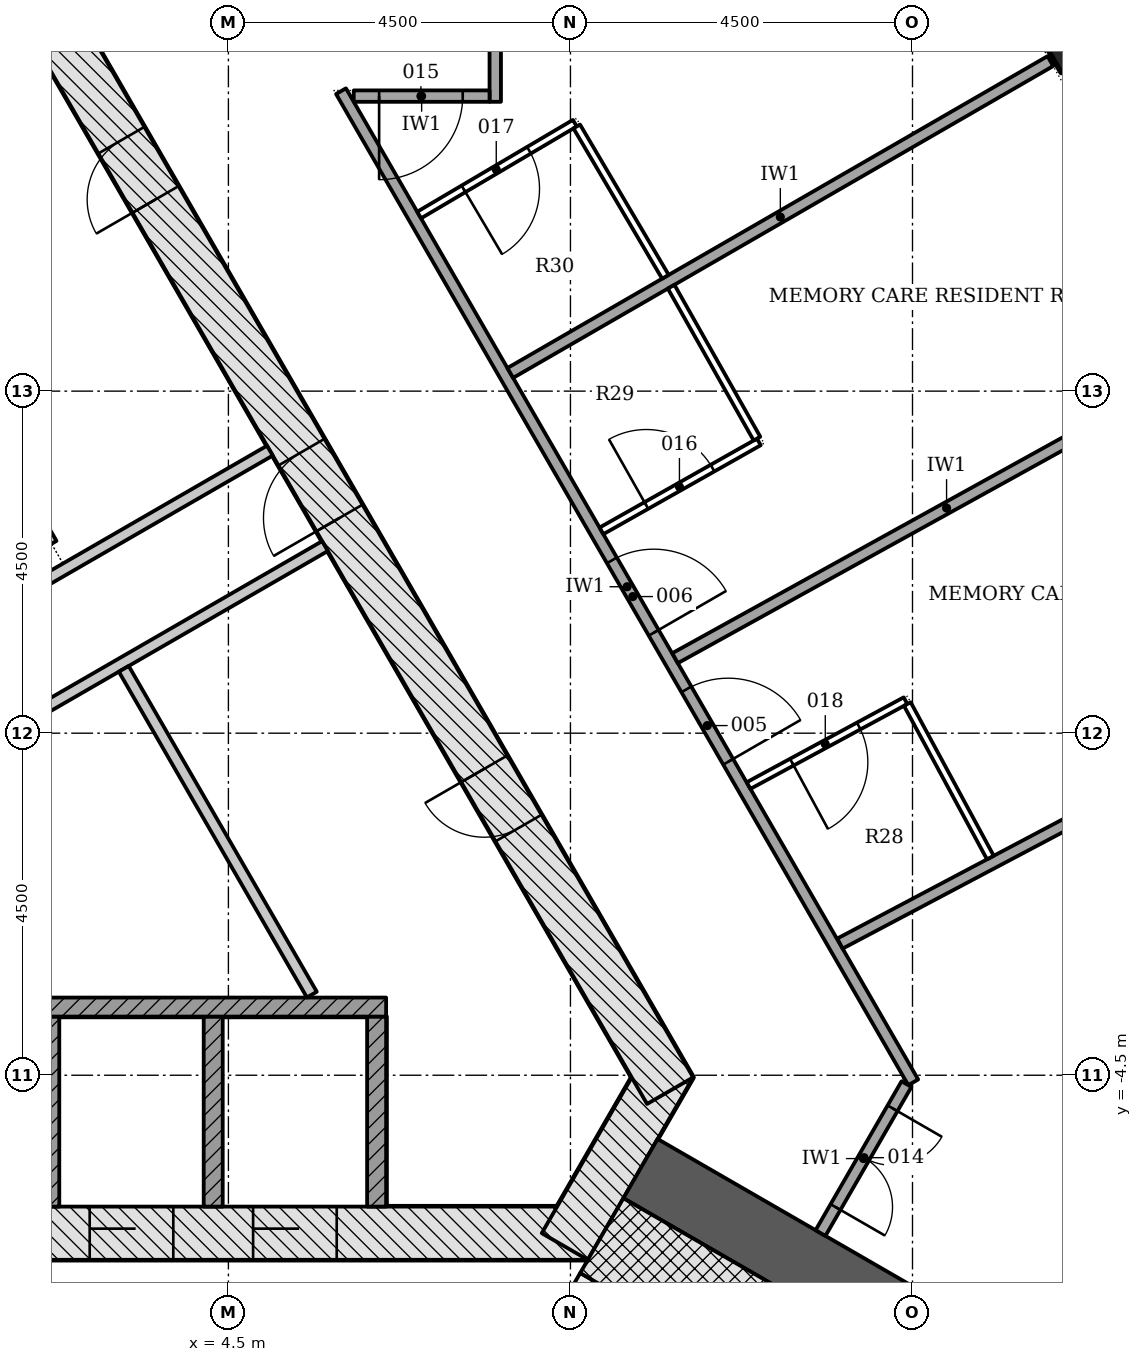
"""IFC4 building model, lengths in metres.
Left out: names, types, materials, properties, quantities, classifications, styles, units other than length and angle.
Written with IfcOpenShell. Run it as: python <this file> out.ifc"""

import sys

from ifc_helpers import new_model, si_unit, direction, frame, frame_2d, origin, origin_2d, place, context, subcontext, project, spatial, rectangle, i_section, extrude, element, fill, save


model = new_model("IFC4")
c1 = context("Model", 3, precision=1e-05, world=origin(), true_north=direction((0.0, 1.0)))
c2 = subcontext(c1, "Body", "Model", "MODEL_VIEW")
j1 = project(units=[si_unit("LENGTHUNIT", "METRE"), si_unit("PLANEANGLEUNIT", "RADIAN")], contexts=[c1])
p1 = place(None, origin())
s1 = spatial("IfcSite", under=j1, at=p1, CompositionType="ELEMENT")
p2 = place(p1, origin())
s2 = spatial("IfcBuilding", under=s1, at=p2, CompositionType="ELEMENT")
p3 = place(p2, frame((0.0, 0.0, 24.0)))
s3 = spatial("IfcBuildingStorey", under=s2, at=p3, CompositionType="ELEMENT", Elevation=24.0)
p4 = place(p3, frame((-9.229, -6.578, -0.2), z_axis=(0.0, 0.0, 1.0), x_axis=(1.0, 0.0, 0.0)))
e1 = element("IfcWall", 1, at=p4, inside=s3, PredefinedType="SHEAR", context=c2, shape_type="SweptSolid", body=[
    extrude(rectangle(XDim=18.458, YDim=0.7, at=frame_2d((9.229, 0.0))), origin(), (0.0, 0.0, 1.0), 3.6),
])
p5 = place(p4, frame((3.304, 0.0, 0.2)))
e2 = element("IfcOpeningElement", 2, at=p5, cuts=e1, PredefinedType="OPENING", context=c2, shape_type="SweptSolid", body=[
    extrude(rectangle(XDim=1.1, YDim=2.1, at=frame_2d((0.55, 1.05))), frame((0.0, 0.36, 0.0), z_axis=(0.0, -1.0, 0.0), x_axis=(1.0, 0.0, 0.0)), (0.0, 0.0, 1.0), 0.72),
])
p6 = place(p4, frame((5.454, 0.0, 0.2)))
e3 = element("IfcOpeningElement", 3, at=p6, cuts=e1, PredefinedType="OPENING", context=c2, shape_type="SweptSolid", body=[
    extrude(rectangle(XDim=1.1, YDim=2.1, at=frame_2d((0.55, 1.05))), frame((0.0, 0.36, 0.0), z_axis=(0.0, -1.0, 0.0), x_axis=(1.0, 0.0, 0.0)), (0.0, 0.0, 1.0), 0.72),
])
p7 = place(p4, frame((7.604, 0.0, 0.2)))
e4 = element("IfcOpeningElement", 4, at=p7, cuts=e1, PredefinedType="OPENING", context=c2, shape_type="SweptSolid", body=[
    extrude(rectangle(XDim=1.1, YDim=2.1, at=frame_2d((0.55, 1.05))), frame((0.0, 0.36, 0.0), z_axis=(0.0, -1.0, 0.0), x_axis=(1.0, 0.0, 0.0)), (0.0, 0.0, 1.0), 0.72),
])
p8 = place(p4, frame((9.754, 0.0, 0.2)))
e5 = element("IfcOpeningElement", 5, at=p8, cuts=e1, PredefinedType="OPENING", context=c2, shape_type="SweptSolid", body=[
    extrude(rectangle(XDim=1.1, YDim=2.1, at=frame_2d((0.55, 1.05))), frame((0.0, 0.36, 0.0), z_axis=(0.0, -1.0, 0.0), x_axis=(1.0, 0.0, 0.0)), (0.0, 0.0, 1.0), 0.72),
])
p9 = place(p4, frame((11.904, 0.0, 0.2)))
e6 = element("IfcOpeningElement", 6, at=p9, cuts=e1, PredefinedType="OPENING", context=c2, shape_type="SweptSolid", body=[
    extrude(rectangle(XDim=1.1, YDim=2.1, at=frame_2d((0.55, 1.05))), frame((0.0, 0.36, 0.0), z_axis=(0.0, -1.0, 0.0), x_axis=(1.0, 0.0, 0.0)), (0.0, 0.0, 1.0), 0.72),
])
p10 = place(p4, frame((14.054, 0.0, 0.2)))
e7 = element("IfcOpeningElement", 7, at=p10, cuts=e1, PredefinedType="OPENING", context=c2, shape_type="SweptSolid", body=[
    extrude(rectangle(XDim=1.1, YDim=2.1, at=frame_2d((0.55, 1.05))), frame((0.0, 0.36, 0.0), z_axis=(0.0, -1.0, 0.0), x_axis=(1.0, 0.0, 0.0)), (0.0, 0.0, 1.0), 0.72),
])
p11 = place(p4, frame((1.079, 0.0, 0.2)))
e8 = element("IfcOpeningElement", 8, at=p11, cuts=e1, PredefinedType="OPENING", context=c2, shape_type="SweptSolid", body=[
    extrude(rectangle(XDim=0.9, YDim=2.1, at=frame_2d((0.45, 1.05))), frame((0.0, 0.36, 0.0), z_axis=(0.0, -1.0, 0.0), x_axis=(1.0, 0.0, 0.0)), (0.0, 0.0, 1.0), 0.72),
])
p12 = place(p3, frame((8.926, -6.753, -0.2), z_axis=(0.0, 0.0, 1.0), x_axis=(0.500042739161, 0.866000726912, 0.0)))
e9 = element("IfcWall", 9, at=p12, inside=s3, PredefinedType="SHEAR", context=c2, shape_type="SweptSolid", body=[
    extrude(rectangle(XDim=2.771, YDim=0.7, at=frame_2d((1.386, 0.0))), origin(), (0.0, 0.0, 1.0), 3.6),
])
p13 = place(p3, frame((10.311, -4.703, -0.2), z_axis=(0.0, 0.0, 1.0), x_axis=(-0.500001446645, 0.866024568562, 0.0)))
e10 = element("IfcWall", 10, at=p13, inside=s3, PredefinedType="SHEAR", context=c2, shape_type="SweptSolid", body=[
    extrude(rectangle(XDim=18.458, YDim=0.7, at=frame_2d((9.229, 0.0))), origin(), (0.0, 0.0, 1.0), 3.6),
])
p14 = place(p13, frame((8.7, 0.0, 0.2)))
e11 = element("IfcOpeningElement", 11, at=p14, cuts=e10, PredefinedType="OPENING", context=c2, shape_type="SweptSolid", body=[
    extrude(rectangle(XDim=1.0, YDim=2.1, at=frame_2d((0.5, 1.05))), frame((0.0, 0.36, 0.0), z_axis=(0.0, -1.0, 0.0), x_axis=(1.0, 0.0, 0.0)), (0.0, 0.0, 1.0), 0.72),
])
p15 = place(p13, frame((3.99, 0.0, 0.2)))
e12 = element("IfcOpeningElement", 12, at=p15, cuts=e10, PredefinedType="OPENING", context=c2, shape_type="SweptSolid", body=[
    extrude(rectangle(XDim=0.9, YDim=2.1, at=frame_2d((0.45, 1.05))), frame((0.0, 0.36, 0.0), z_axis=(0.0, -1.0, 0.0), x_axis=(1.0, 0.0, 0.0)), (0.0, 0.0, 1.0), 0.72),
])
p16 = place(p13, frame((13.539, 0.0, 0.2)))
e13 = element("IfcOpeningElement", 13, at=p16, cuts=e10, PredefinedType="OPENING", context=c2, shape_type="SweptSolid", body=[
    extrude(rectangle(XDim=0.9, YDim=2.1, at=frame_2d((0.45, 1.05))), frame((0.0, 0.36, 0.0), z_axis=(0.0, -1.0, 0.0), x_axis=(1.0, 0.0, 0.0)), (0.0, 0.0, 1.0), 0.72),
])
p17 = place(p3, frame((9.922, -5.728, -0.2), z_axis=(0.0, 0.0, 1.0), x_axis=(0.866028046028, -0.499995423472, 0.0)))
e14 = element("IfcWall", 14, at=p17, inside=s3, PredefinedType="SHEAR", context=c2, shape_type="SweptSolid", body=[
    extrude(rectangle(XDim=14.633, YDim=0.9, at=frame_2d((7.316, 0.0))), origin(), (0.0, 0.0, 1.0), 3.6),
])
p18 = place(p3, frame((15.531, 8.967, -0.2), z_axis=(0.0, 0.0, 1.0), x_axis=(-0.5, 0.866025403784, 0.0)))
e15 = element("IfcColumn", 15, at=p18, inside=s3, PredefinedType="COLUMN", context=c2, shape_type="SweptSolid", body=[
    extrude(i_section(OverallWidth=0.404, OverallDepth=0.406, WebThickness=0.027, FlangeThickness=0.044, FilletRadius=0.015, at=origin_2d()), origin(), (0.0, 0.0, 1.0), 3.6),
])
for number, where, z_axis, x_axis in (
    (16, (2.15, -6.228, -0.2), (0.0, 0.0, 1.0), (0.0, 1.0, 0.0)),
    (17, (4.3, -6.228, -0.2), (0.0, 0.0, 1.0), (0.0, 1.0, 0.0)),
    (18, (6.45, -6.228, -0.2), (0.0, 0.0, 1.0), (0.0, 1.0, 0.0)),
):
    element("IfcWall", number, at=place(p3, frame(where, z_axis=z_axis, x_axis=x_axis)), inside=s3, PredefinedType="PARTITIONING", context=c2, shape_type="SweptSolid", body=[
        extrude(rectangle(XDim=2.5, YDim=0.25, at=frame_2d((1.25, 0.0))), origin(), (0.0, 0.0, 1.0), 3.6),
    ])
p19 = place(p3, frame((-6.575, -3.603, 0.0), z_axis=(0.0, 0.0, 1.0), x_axis=(1.0, 0.0, 0.0)))
e19 = element("IfcWall", 19, at=p19, inside=s3, PredefinedType="PARTITIONING", context=c2, shape_type="SweptSolid", body=[
    extrude(rectangle(XDim=13.15, YDim=0.25, at=frame_2d((6.575, 0.0))), origin(), (0.0, 0.0, 1.0), 3.4),
])
p20 = place(p3, frame((-4.523, -1.807, 0.0), z_axis=(0.0, 0.0, 1.0), x_axis=(0.866030300338, 0.499991518824, 0.0)))
e20 = element("IfcWall", 20, at=p20, inside=s3, PredefinedType="PARTITIONING", context=c2, shape_type="SweptSolid", body=[
    extrude(rectangle(XDim=11.049, YDim=0.15, at=frame_2d((5.524, 0.0))), origin(), (0.0, 0.0, 1.0), 3.4),
])
p21 = place(p20, frame((3.525, 0.0, 0.0)))
e21 = element("IfcOpeningElement", 21, at=p21, cuts=e20, PredefinedType="OPENING", context=c2, shape_type="SweptSolid", body=[
    extrude(rectangle(XDim=0.9, YDim=2.1, at=frame_2d((0.45, 1.05))), frame((0.0, 0.085, 0.0), z_axis=(0.0, -1.0, 0.0), x_axis=(1.0, 0.0, 0.0)), (0.0, 0.0, 1.0), 0.17),
])
p22 = place(p3, frame((-4.404, -3.413, 0.0), z_axis=(0.0, 0.0, 1.0), x_axis=(0.866022252853, 0.500005457533, 0.0)))
e22 = element("IfcWall", 22, at=p22, inside=s3, PredefinedType="PARTITIONING", context=c2, shape_type="SweptSolid", body=[
    extrude(rectangle(XDim=11.749, YDim=0.15, at=frame_2d((5.875, 0.0))), origin(), (0.0, 0.0, 1.0), 3.4),
])
p23 = place(p22, frame((3.875, 0.0, 0.0)))
e23 = element("IfcOpeningElement", 23, at=p23, cuts=e22, PredefinedType="OPENING", context=c2, shape_type="SweptSolid", body=[
    extrude(rectangle(XDim=0.9, YDim=2.1, at=frame_2d((0.45, 1.05))), frame((0.0, 0.085, 0.0), z_axis=(0.0, -1.0, 0.0), x_axis=(1.0, 0.0, 0.0)), (0.0, 0.0, 1.0), 0.17),
])
p24 = place(p3, frame((2.174, 2.492, 0.0), z_axis=(0.0, 0.0, 1.0), x_axis=(-0.499999641798, 0.866025610592, 0.0)))
e24 = element("IfcWall", 24, at=p24, inside=s3, PredefinedType="PARTITIONING", context=c2, shape_type="SweptSolid", body=[
    extrude(rectangle(XDim=4.244, YDim=0.15, at=frame_2d((2.122, 0.0))), origin(), (0.0, 0.0, 1.0), 3.4),
])
p25 = place(p3, frame((5.598, -3.439, 0.0), z_axis=(0.0, 0.0, 1.0), x_axis=(-0.500007155043, 0.866021272779, 0.0)))
e25 = element("IfcWall", 25, at=p25, inside=s3, PredefinedType="PARTITIONING", context=c2, shape_type="SweptSolid", body=[
    extrude(rectangle(XDim=4.949, YDim=0.15, at=frame_2d((2.474, 0.0))), origin(), (0.0, 0.0, 1.0), 3.4),
])
p26 = place(p3, frame((7.44, -10.226, -0.2), z_axis=(0.0, 0.0, 1.0), x_axis=(0.500022077904, 0.866012656725, 0.0)))
e26 = element("IfcWall", 26, at=p26, inside=s3, PredefinedType="SHEAR", context=c2, shape_type="SweptSolid", body=[
    extrude(rectangle(XDim=3.55, YDim=0.2, at=frame_2d((1.775, 0.0))), origin(), (0.0, 0.0, 1.0), 3.6),
])
p27 = place(p26, frame((1.175, 0.0, 0.2)))
e27 = element("IfcOpeningElement", 27, at=p27, cuts=e26, PredefinedType="OPENING", context=c2, shape_type="SweptSolid", body=[
    extrude(rectangle(XDim=1.2, YDim=2.1, at=frame_2d((0.6, 1.05))), frame((0.0, 0.11, 0.0), z_axis=(0.0, -1.0, 0.0), x_axis=(1.0, 0.0, 0.0)), (0.0, 0.0, 1.0), 0.22),
])
p28 = place(p3, frame((9.413, -6.61, -0.2), z_axis=(0.0, 0.0, 1.0), x_axis=(0.866018442252, -0.500012057535, 0.0)))
e28 = element("IfcWall", 28, at=p28, inside=s3, PredefinedType="SHEAR", context=c2, shape_type="SweptSolid", body=[
    extrude(rectangle(XDim=7.2, YDim=1.136, at=frame_2d((3.6, 0.0))), origin(), (0.0, 0.0, 1.0), 3.6),
])
p29 = place(p3, frame((5.981, 8.446, 0.0), z_axis=(0.0, 0.0, 1.0), x_axis=(0.499996620721, -0.866027354803, 0.0)))
e29 = element("IfcWall", 29, at=p29, inside=s3, PredefinedType="PARTITIONING", context=c2, shape_type="SweptSolid", body=[
    extrude(rectangle(XDim=15.057, YDim=0.15, at=frame_2d((7.528, 0.0))), origin(), (0.0, 0.0, 1.0), 2.768),
])
p30 = place(p29, frame((9.087, 0.0, 0.0)))
e30 = element("IfcOpeningElement", 30, at=p30, cuts=e29, PredefinedType="OPENING", context=c2, shape_type="SweptSolid", body=[
    extrude(rectangle(XDim=1.1, YDim=2.1, at=frame_2d((0.55, 1.05))), frame((0.0, 0.085, 0.0), z_axis=(0.0, -1.0, 0.0), x_axis=(1.0, 0.0, 0.0)), (0.0, 0.0, 1.0), 0.17),
])
p31 = place(p29, frame((7.128, 0.0, 0.0)))
e31 = element("IfcOpeningElement", 31, at=p31, cuts=e29, PredefinedType="OPENING", context=c2, shape_type="SweptSolid", body=[
    extrude(rectangle(XDim=1.1, YDim=2.1, at=frame_2d((0.55, 1.05))), frame((0.0, 0.085, 0.0), z_axis=(0.0, -1.0, 0.0), x_axis=(1.0, 0.0, 0.0)), (0.0, 0.0, 1.0), 0.17),
])
p32 = place(p3, frame((8.01, 14.256, 0.0), z_axis=(0.0, 0.0, 1.0), x_axis=(0.0, -1.0, 0.0)))
e32 = element("IfcWall", 32, at=p32, inside=s3, PredefinedType="PARTITIONING", context=c2, shape_type="SweptSolid", body=[
    extrude(rectangle(XDim=5.95, YDim=0.15, at=frame_2d((2.975, 0.0))), origin(), (0.0, 0.0, 1.0), 2.768),
])
p33 = place(p32, frame((1.807, 0.0, 0.0)))
e33 = element("IfcOpeningElement", 33, at=p33, cuts=e32, PredefinedType="OPENING", context=c2, shape_type="SweptSolid", body=[
    extrude(rectangle(XDim=1.0, YDim=2.1, at=frame_2d((0.5, 1.05))), frame((0.0, 0.085, 0.0), z_axis=(0.0, -1.0, 0.0), x_axis=(1.0, 0.0, 0.0)), (0.0, 0.0, 1.0), 0.17),
])
p34 = place(p3, frame((13.421, -4.617, 0.0), z_axis=(0.0, 0.0, 1.0), x_axis=(-0.499946688677, -0.866056180903, 0.0)))
e34 = element("IfcWall", 34, at=p34, inside=s3, PredefinedType="PARTITIONING", context=c2, shape_type="SweptSolid", body=[
    extrude(rectangle(XDim=2.262, YDim=0.15, at=frame_2d((1.131, 0.0))), origin(), (0.0, 0.0, 1.0), 3.4),
])
p35 = place(p34, frame((0.367, 0.0, 0.0)))
e35 = element("IfcOpeningElement", 35, at=p35, cuts=e34, PredefinedType="OPENING", context=c2, shape_type="SweptSolid", body=[
    extrude(rectangle(XDim=1.5, YDim=2.1, at=frame_2d((0.75, 1.05))), frame((0.0, 0.085, 0.0), z_axis=(0.0, -1.0, 0.0), x_axis=(1.0, 0.0, 0.0)), (0.0, 0.0, 1.0), 0.17),
])
p36 = place(p3, frame((7.936, 8.381, 0.0), z_axis=(0.0, 0.0, 1.0), x_axis=(-1.0, 0.0, 0.0)))
e36 = element("IfcWall", 36, at=p36, inside=s3, PredefinedType="PARTITIONING", context=c2, shape_type="SweptSolid", body=[
    extrude(rectangle(XDim=1.787, YDim=0.15, at=frame_2d((0.894, 0.0))), origin(), (0.0, 0.0, 1.0), 2.768),
])
p37 = place(p36, frame((0.353, 0.0, 0.0)))
e37 = element("IfcOpeningElement", 37, at=p37, cuts=e36, PredefinedType="OPENING", context=c2, shape_type="SweptSolid", body=[
    extrude(rectangle(XDim=1.1, YDim=2.1, at=frame_2d((0.55, 1.05))), frame((0.0, 0.085, 0.0), z_axis=(0.0, -1.0, 0.0), x_axis=(1.0, 0.0, 0.0)), (0.0, 0.0, 1.0), 0.17),
])
p38 = place(p3, frame((15.314, 8.842, 0.0), z_axis=(0.0, 0.0, 1.0), x_axis=(-0.866015124653, -0.500017803555, 0.0)))
e38 = element("IfcWall", 38, at=p38, inside=s3, PredefinedType="PARTITIONING", context=c2, shape_type="SweptSolid", body=[
    extrude(rectangle(XDim=8.205, YDim=0.15, at=frame_2d((4.103, 0.0))), origin(), (0.0, 0.0, 1.0), 2.768),
])
p39 = place(p3, frame((17.521, 4.937, 0.0), z_axis=(0.0, 0.0, 1.0), x_axis=(-0.875148563779, -0.483854307944, 0.0)))
e39 = element("IfcWall", 39, at=p39, inside=s3, PredefinedType="PARTITIONING", context=c2, shape_type="SweptSolid", body=[
    extrude(rectangle(XDim=8.164, YDim=0.15, at=frame_2d((4.082, 0.0))), origin(), (0.0, 0.0, 1.0), 2.768),
])
p40 = place(p3, frame((19.654, 0.992, 0.0), z_axis=(0.0, 0.0, 1.0), x_axis=(-0.883980590433, -0.467523599124, 0.0)))
e40 = element("IfcWall", 40, at=p40, inside=s3, PredefinedType="PARTITIONING", context=c2, shape_type="SweptSolid", body=[
    extrude(rectangle(XDim=8.041, YDim=0.15, at=frame_2d((4.021, 0.0))), origin(), (0.0, 0.0, 1.0), 2.768),
])
p41 = place(p3, frame((9.408, 2.662, 0.0), z_axis=(0.0, 0.0, 1.0), x_axis=(0.870608725809, 0.491976062981, 0.0)))
e41 = element("IfcWall", 41, at=p41, inside=s3, PredefinedType="PARTITIONING", context=c2, shape_type="SweptSolid", body=[
    extrude(rectangle(XDim=2.378, YDim=0.1, at=frame_2d((1.189, 0.0))), origin(), (0.0, 0.0, 1.0), 3.4),
])
p42 = place(p41, frame((0.678, 0.0, 0.0)))
e42 = element("IfcOpeningElement", 42, at=p42, cuts=e41, PredefinedType="OPENING", context=c2, shape_type="SweptSolid", body=[
    extrude(rectangle(XDim=1.0, YDim=2.1, at=frame_2d((0.5, 1.05))), frame((0.0, 0.06, 0.0), z_axis=(0.0, -1.0, 0.0), x_axis=(1.0, 0.0, 0.0)), (0.0, 0.0, 1.0), 0.12),
])
p43 = place(p3, frame((9.058, 8.025, 0.0), z_axis=(0.0, 0.0, 1.0), x_axis=(-0.861363599661, -0.507988926236, 0.0)))
e43 = element("IfcWall", 43, at=p43, inside=s3, PredefinedType="PARTITIONING", context=c2, shape_type="SweptSolid", body=[
    extrude(rectangle(XDim=2.378, YDim=0.1, at=frame_2d((1.189, 0.0))), origin(), (0.0, 0.0, 1.0), 3.4),
])
p44 = place(p43, frame((0.7, 0.0, 0.0)))
e44 = element("IfcOpeningElement", 44, at=p44, cuts=e43, PredefinedType="OPENING", context=c2, shape_type="SweptSolid", body=[
    extrude(rectangle(XDim=1.0, YDim=2.1, at=frame_2d((0.5, 1.05))), frame((0.0, 0.06, 0.0), z_axis=(0.0, -1.0, 0.0), x_axis=(1.0, 0.0, 0.0)), (0.0, 0.0, 1.0), 0.12),
])
p45 = place(p3, frame((13.408, 0.427, 0.0), z_axis=(0.0, 0.0, 1.0), x_axis=(-0.879611235398, -0.475693256797, 0.0)))
e45 = element("IfcWall", 45, at=p45, inside=s3, PredefinedType="PARTITIONING", context=c2, shape_type="SweptSolid", body=[
    extrude(rectangle(XDim=2.347, YDim=0.1, at=frame_2d((1.173, 0.0))), origin(), (0.0, 0.0, 1.0), 3.4),
])
p46 = place(p45, frame((0.7, 0.0, 0.0)))
e46 = element("IfcOpeningElement", 46, at=p46, cuts=e45, PredefinedType="OPENING", context=c2, shape_type="SweptSolid", body=[
    extrude(rectangle(XDim=1.0, YDim=2.1, at=frame_2d((0.5, 1.05))), frame((0.0, 0.06, 0.0), z_axis=(0.0, -1.0, 0.0), x_axis=(1.0, 0.0, 0.0)), (0.0, 0.0, 1.0), 0.12),
])
for number, where, z_axis, x_axis in (
    (47, (14.524, -1.636, 0.0), (0.0, 0.0, 1.0), (-0.476, 0.88, 0.0)),
    (48, (10.325, 5.874, 0.0), (0.0, 0.0, 1.0), (0.492, -0.871, 0.0)),
    (49, (10.249, 6.004, 0.0), (0.0, 0.0, 1.0), (-0.508, 0.861, 0.0)),
):
    element("IfcWall", number, at=place(p3, frame(where, z_axis=z_axis, x_axis=x_axis)), inside=s3, PredefinedType="PARTITIONING", context=c2, shape_type="SweptSolid", body=[
        extrude(rectangle(XDim=2.296, YDim=0.1, at=frame_2d((1.148, 0.0))), origin(), (0.0, 0.0, 1.0), 2.768),
    ])
p47 = place(p9, origin())
e50 = element("IfcDoor", 50, at=p47, inside=s3, OperationType="DOUBLE_DOOR_SLIDING", PredefinedType="DOOR", context=c2, shape_type="SweptSolid", body=[
    extrude(rectangle(XDim=1.1, YDim=2.1, at=frame_2d((0.55, 1.05))), frame((0.0, 0.025, 0.0), z_axis=(0.0, -1.0, 0.0), x_axis=(1.0, 0.0, 0.0)), (0.0, 0.0, 1.0), 0.05),
])
fill(e6, e50)
p48 = place(p10, origin())
e51 = element("IfcDoor", 51, at=p48, inside=s3, OperationType="DOUBLE_DOOR_SLIDING", PredefinedType="DOOR", context=c2, shape_type="SweptSolid", body=[
    extrude(rectangle(XDim=1.1, YDim=2.1, at=frame_2d((0.55, 1.05))), frame((0.0, 0.025, 0.0), z_axis=(0.0, -1.0, 0.0), x_axis=(1.0, 0.0, 0.0)), (0.0, 0.0, 1.0), 0.05),
])
fill(e7, e51)
p49 = place(p14, origin())
e52 = element("IfcDoor", 52, at=p49, inside=s3, OperationType="SINGLE_SWING_LEFT", PredefinedType="DOOR", context=c2, shape_type="SweptSolid", body=[
    extrude(rectangle(XDim=1.0, YDim=2.1, at=frame_2d((0.5, 1.05))), frame((0.0, 0.075, 0.0), z_axis=(0.0, -1.0, 0.0), x_axis=(1.0, 0.0, 0.0)), (0.0, 0.0, 1.0), 0.15),
])
fill(e11, e52)
p50 = place(p15, origin())
e53 = element("IfcDoor", 53, at=p50, inside=s3, OperationType="SINGLE_SWING_RIGHT", PredefinedType="DOOR", context=c2, shape_type="SweptSolid", body=[
    extrude(rectangle(XDim=0.9, YDim=2.1, at=frame_2d((0.45, 1.05))), frame((0.0, 0.075, 0.0), z_axis=(0.0, -1.0, 0.0), x_axis=(1.0, 0.0, 0.0)), (0.0, 0.0, 1.0), 0.15),
])
fill(e12, e53)
p51 = place(p16, origin())
e54 = element("IfcDoor", 54, at=p51, inside=s3, OperationType="SINGLE_SWING_LEFT", PredefinedType="DOOR", context=c2, shape_type="SweptSolid", body=[
    extrude(rectangle(XDim=0.9, YDim=2.1, at=frame_2d((0.45, 1.05))), frame((0.0, 0.075, 0.0), z_axis=(0.0, -1.0, 0.0), x_axis=(1.0, 0.0, 0.0)), (0.0, 0.0, 1.0), 0.15),
])
fill(e13, e54)
p52 = place(p30, origin())
e55 = element("IfcDoor", 55, at=p52, inside=s3, OperationType="SINGLE_SWING_RIGHT", PredefinedType="DOOR", context=c2, shape_type="SweptSolid", body=[
    extrude(rectangle(XDim=1.1, YDim=2.1, at=frame_2d((0.55, 1.05))), frame((0.0, 0.025, 0.0), z_axis=(0.0, -1.0, 0.0), x_axis=(1.0, 0.0, 0.0)), (0.0, 0.0, 1.0), 0.05),
])
fill(e30, e55)
p53 = place(p31, origin())
e56 = element("IfcDoor", 56, at=p53, inside=s3, OperationType="SINGLE_SWING_RIGHT", PredefinedType="DOOR", context=c2, shape_type="SweptSolid", body=[
    extrude(rectangle(XDim=1.1, YDim=2.1, at=frame_2d((0.55, 1.05))), frame((0.0, 0.025, 0.0), z_axis=(0.0, -1.0, 0.0), x_axis=(1.0, 0.0, 0.0)), (0.0, 0.0, 1.0), 0.05),
])
fill(e31, e56)
p54 = place(p35, origin())
e57 = element("IfcDoor", 57, at=p54, inside=s3, OperationType="DOUBLE_DOOR_SINGLE_SWING", PredefinedType="DOOR", context=c2, shape_type="SweptSolid", body=[
    extrude(rectangle(XDim=1.5, YDim=2.1, at=frame_2d((0.75, 1.05))), frame((0.0, 0.025, 0.0), z_axis=(0.0, -1.0, 0.0), x_axis=(1.0, 0.0, 0.0)), (0.0, 0.0, 1.0), 0.05),
])
fill(e35, e57)
p55 = place(p37, origin())
e58 = element("IfcDoor", 58, at=p55, inside=s3, OperationType="SINGLE_SWING_RIGHT", PredefinedType="DOOR", context=c2, shape_type="SweptSolid", body=[
    extrude(rectangle(XDim=1.1, YDim=2.1, at=frame_2d((0.55, 1.05))), frame((0.0, 0.025, 0.0), z_axis=(0.0, -1.0, 0.0), x_axis=(1.0, 0.0, 0.0)), (0.0, 0.0, 1.0), 0.05),
])
fill(e37, e58)
p56 = place(p42, origin())
e59 = element("IfcDoor", 59, at=p56, inside=s3, OperationType="SINGLE_SWING_LEFT", PredefinedType="DOOR", context=c2, shape_type="SweptSolid", body=[
    extrude(rectangle(XDim=1.0, YDim=2.1, at=frame_2d((0.5, 1.05))), frame((0.0, 0.025, 0.0), z_axis=(0.0, -1.0, 0.0), x_axis=(1.0, 0.0, 0.0)), (0.0, 0.0, 1.0), 0.05),
])
fill(e42, e59)
p57 = place(p44, origin())
e60 = element("IfcDoor", 60, at=p57, inside=s3, OperationType="SINGLE_SWING_RIGHT", PredefinedType="DOOR", context=c2, shape_type="SweptSolid", body=[
    extrude(rectangle(XDim=1.0, YDim=2.1, at=frame_2d((0.5, 1.05))), frame((0.0, 0.025, 0.0), z_axis=(0.0, -1.0, 0.0), x_axis=(1.0, 0.0, 0.0)), (0.0, 0.0, 1.0), 0.05),
])
fill(e44, e60)
p58 = place(p46, origin())
e61 = element("IfcDoor", 61, at=p58, inside=s3, OperationType="SINGLE_SWING_RIGHT", PredefinedType="DOOR", context=c2, shape_type="SweptSolid", body=[
    extrude(rectangle(XDim=1.0, YDim=2.1, at=frame_2d((0.5, 1.05))), frame((0.0, 0.025, 0.0), z_axis=(0.0, -1.0, 0.0), x_axis=(1.0, 0.0, 0.0)), (0.0, 0.0, 1.0), 0.05),
])
fill(e46, e61)
save(model, sys.argv[1])
